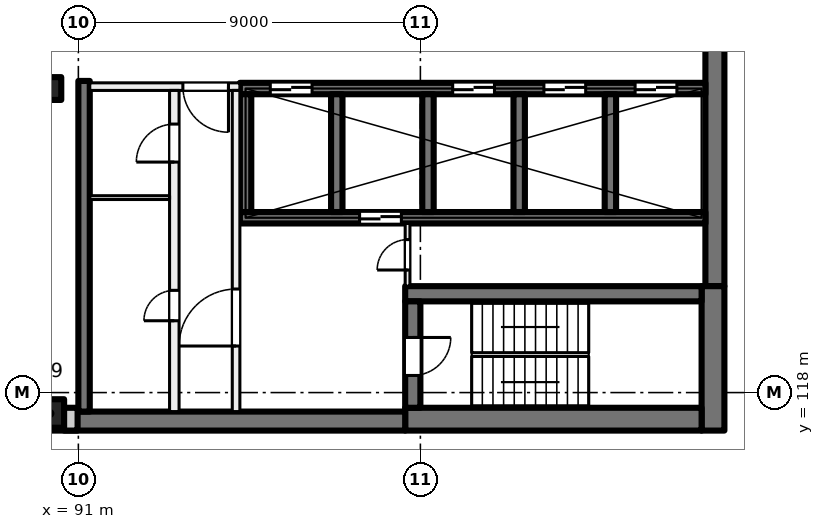
"""IFC4 building model, lengths in metres.
Left out: names, types, materials, properties, quantities, classifications, styles, units other than length and angle.
Written with IfcOpenShell. Run it as: python <this file> out.ifc"""

import sys

from ifc_helpers import new_model, si_unit, direction, frame, frame_2d, origin, origin_2d, place, context, subcontext, project, spatial, rectangle, extrude, element, fill, save


model = new_model("IFC4")
c1 = context("Model", 3, precision=1e-05, world=origin(), true_north=direction((0.0, 1.0)))
c2 = subcontext(c1, "Body", "Model", "MODEL_VIEW")
j1 = project(units=[si_unit("LENGTHUNIT", "METRE"), si_unit("PLANEANGLEUNIT", "RADIAN")], contexts=[c1])
p1 = place(None, origin())
s1 = spatial("IfcSite", under=j1, at=p1, CompositionType="ELEMENT")
p2 = place(p1, origin())
s2 = spatial("IfcBuilding", under=s1, at=p2, CompositionType="ELEMENT")
p3 = place(p2, frame((0.0, 0.0, 200.0)))
s3 = spatial("IfcBuildingStorey", under=s2, at=p3, CompositionType="ELEMENT", Elevation=200.0)
p4 = place(p3, frame((90.25, 126.0, 0.0), z_axis=(0.0, 0.0, 1.0), x_axis=(1.0, 0.0, 0.0)))
e1 = element("IfcColumn", 1, at=p4, inside=s3, PredefinedType="COLUMN", context=c2, shape_type="SweptSolid", body=[
    extrude(rectangle(XDim=0.6, YDim=0.6, at=origin_2d()), origin(), (0.0, 0.0, 1.0), 4.0),
])
p5 = place(p3, frame((90.25, 117.45, 0.0), z_axis=(0.0, 0.0, 1.0), x_axis=(1.0, 0.0, 0.0)))
e2 = element("IfcColumn", 2, at=p5, inside=s3, PredefinedType="COLUMN", context=c2, shape_type="SweptSolid", body=[
    extrude(rectangle(XDim=0.75, YDim=0.75, at=origin_2d()), origin(), (0.0, 0.0, 1.0), 4.0),
])
p6 = place(p3, frame((107.75, 135.2, 0.0), z_axis=(0.0, 0.0, 1.0), x_axis=(0.0, -1.0, 0.0)))
e3 = element("IfcWall", 3, at=p6, inside=s3, PredefinedType="SHEAR", context=c2, shape_type="SweptSolid", body=[
    extrude(rectangle(XDim=14.4, YDim=0.5, at=frame_2d((7.2, 0.0))), origin(), (0.0, 0.0, 1.0), 4.0),
])
p7 = place(p3, frame((107.7, 120.8, 0.0), z_axis=(0.0, 0.0, 1.0), x_axis=(0.0, -1.0, 0.0)))
e4 = element("IfcWall", 4, at=p7, inside=s3, PredefinedType="SHEAR", context=c2, shape_type="SweptSolid", body=[
    extrude(rectangle(XDim=3.8, YDim=0.6, at=frame_2d((1.9, 0.0))), origin(), (0.0, 0.0, 1.0), 4.0),
])
p8 = place(p3, frame((107.4, 117.3, 0.0), z_axis=(0.0, 0.0, 1.0), x_axis=(-1.0, 0.0, 0.0)))
e5 = element("IfcWall", 5, at=p8, inside=s3, PredefinedType="SHEAR", context=c2, shape_type="SweptSolid", body=[
    extrude(rectangle(XDim=7.8, YDim=0.6, at=frame_2d((3.9, 0.0))), origin(), (0.0, 0.0, 1.0), 4.0),
])
p9 = place(p3, frame((99.6, 117.25, 0.0), z_axis=(0.0, 0.0, 1.0), x_axis=(-1.0, 0.0, 0.0)))
e6 = element("IfcWall", 6, at=p9, inside=s3, PredefinedType="SHEAR", context=c2, shape_type="SweptSolid", body=[
    extrude(rectangle(XDim=8.975, YDim=0.5, at=frame_2d((4.488, 0.0))), origin(), (0.0, 0.0, 1.0), 4.0),
])
p10 = place(p3, frame((107.4, 120.6, 0.0), z_axis=(0.0, 0.0, 1.0), x_axis=(-1.0, 0.0, 0.0)))
e7 = element("IfcWall", 7, at=p10, inside=s3, PredefinedType="SHEAR", context=c2, shape_type="SweptSolid", body=[
    extrude(rectangle(XDim=7.8, YDim=0.4, at=frame_2d((3.9, 0.0))), origin(), (0.0, 0.0, 1.0), 4.0),
])
p11 = place(p3, frame((99.8, 120.4, 0.0), z_axis=(0.0, 0.0, 1.0), x_axis=(0.0, -1.0, 0.0)))
e8 = element("IfcWall", 8, at=p11, inside=s3, PredefinedType="SHEAR", context=c2, shape_type="SweptSolid", body=[
    extrude(rectangle(XDim=2.8, YDim=0.4, at=frame_2d((1.4, 0.0))), origin(), (0.0, 0.0, 1.0), 4.0),
])
p12 = place(p11, frame((0.95, 0.0, 0.0)))
e9 = element("IfcOpeningElement", 9, at=p12, cuts=e8, PredefinedType="OPENING", context=c2, shape_type="SweptSolid", body=[
    extrude(rectangle(XDim=1.0, YDim=2.1, at=frame_2d((0.5, 1.05))), frame((0.0, 0.21, 0.0), z_axis=(0.0, -1.0, 0.0), x_axis=(1.0, 0.0, 0.0)), (0.0, 0.0, 1.0), 0.42),
])
p13 = place(p3, frame((107.5, 126.0, 0.0), z_axis=(0.0, 0.0, 1.0), x_axis=(-1.0, 0.0, 0.0)))
e10 = element("IfcWall", 10, at=p13, inside=s3, PredefinedType="SHEAR", context=c2, shape_type="SweptSolid", body=[
    extrude(rectangle(XDim=12.25, YDim=0.3, at=frame_2d((6.125, 0.0))), origin(), (0.0, 0.0, 1.0), 4.0),
])
p14 = place(p13, frame((0.75, 0.0, 0.0)))
e11 = element("IfcOpeningElement", 11, at=p14, cuts=e10, PredefinedType="OPENING", context=c2, shape_type="SweptSolid", body=[
    extrude(rectangle(XDim=1.1, YDim=2.1, at=frame_2d((0.55, 1.05))), frame((0.0, 0.16, 0.0), z_axis=(0.0, -1.0, 0.0), x_axis=(1.0, 0.0, 0.0)), (0.0, 0.0, 1.0), 0.32),
])
p15 = place(p13, frame((3.15, 0.0, 0.0)))
e12 = element("IfcOpeningElement", 12, at=p15, cuts=e10, PredefinedType="OPENING", context=c2, shape_type="SweptSolid", body=[
    extrude(rectangle(XDim=1.1, YDim=2.1, at=frame_2d((0.55, 1.05))), frame((0.0, 0.16, 0.0), z_axis=(0.0, -1.0, 0.0), x_axis=(1.0, 0.0, 0.0)), (0.0, 0.0, 1.0), 0.32),
])
p16 = place(p13, frame((5.55, 0.0, 0.0)))
e13 = element("IfcOpeningElement", 13, at=p16, cuts=e10, PredefinedType="OPENING", context=c2, shape_type="SweptSolid", body=[
    extrude(rectangle(XDim=1.1, YDim=2.1, at=frame_2d((0.55, 1.05))), frame((0.0, 0.16, 0.0), z_axis=(0.0, -1.0, 0.0), x_axis=(1.0, 0.0, 0.0)), (0.0, 0.0, 1.0), 0.32),
])
p17 = place(p13, frame((10.35, 0.0, 0.0)))
e14 = element("IfcOpeningElement", 14, at=p17, cuts=e10, PredefinedType="OPENING", context=c2, shape_type="SweptSolid", body=[
    extrude(rectangle(XDim=1.1, YDim=2.1, at=frame_2d((0.55, 1.05))), frame((0.0, 0.16, 0.0), z_axis=(0.0, -1.0, 0.0), x_axis=(1.0, 0.0, 0.0)), (0.0, 0.0, 1.0), 0.32),
])
p18 = place(p3, frame((107.5, 122.6, 0.0), z_axis=(0.0, 0.0, 1.0), x_axis=(-1.0, 0.0, 0.0)))
e15 = element("IfcWall", 15, at=p18, inside=s3, PredefinedType="SHEAR", context=c2, shape_type="SweptSolid", body=[
    extrude(rectangle(XDim=12.25, YDim=0.3, at=frame_2d((6.125, 0.0))), origin(), (0.0, 0.0, 1.0), 4.0),
])
p19 = place(p18, frame((8.0, 0.0, 0.0)))
e16 = element("IfcOpeningElement", 16, at=p19, cuts=e15, PredefinedType="OPENING", context=c2, shape_type="SweptSolid", body=[
    extrude(rectangle(XDim=1.1, YDim=2.1, at=frame_2d((0.55, 1.05))), frame((0.0, 0.16, 0.0), z_axis=(0.0, -1.0, 0.0), x_axis=(1.0, 0.0, 0.0)), (0.0, 0.0, 1.0), 0.32),
])
for number, where, z_axis, x_axis in (
    (17, (105.0, 125.85, 0.0), (0.0, 0.0, 1.0), (0.0, -1.0, 0.0)),
    (18, (102.6, 125.85, 0.0), (0.0, 0.0, 1.0), (0.0, -1.0, 0.0)),
    (19, (100.2, 125.85, 0.0), (0.0, 0.0, 1.0), (0.0, -1.0, 0.0)),
    (20, (97.8, 125.85, 0.0), (0.0, 0.0, 1.0), (0.0, -1.0, 0.0)),
    (21, (95.4, 125.85, 0.0), (0.0, 0.0, 1.0), (0.0, -1.0, 0.0)),
):
    element("IfcWall", number, at=place(p3, frame(where, z_axis=z_axis, x_axis=x_axis)), inside=s3, PredefinedType="SHEAR", context=c2, shape_type="SweptSolid", body=[
        extrude(rectangle(XDim=3.1, YDim=0.3, at=frame_2d((1.55, 0.0))), origin(), (0.0, 0.0, 1.0), 4.0),
    ])
p20 = place(p3, frame((91.15, 126.2, 0.0), z_axis=(0.0, 0.0, 1.0), x_axis=(0.0, -1.0, 0.0)))
e22 = element("IfcWall", 22, at=p20, inside=s3, PredefinedType="SHEAR", context=c2, shape_type="SweptSolid", body=[
    extrude(rectangle(XDim=8.7, YDim=0.3, at=frame_2d((4.35, 0.0))), origin(), (0.0, 0.0, 1.0), 4.0),
])
p21 = place(p3, frame((90.98, 117.3, 0.0), z_axis=(0.0, 0.0, 1.0), x_axis=(-1.0, 0.0, 0.0)))
e23 = element("IfcWall", 23, at=p21, inside=s3, PredefinedType="SOLIDWALL", context=c2, shape_type="SweptSolid", body=[
    extrude(rectangle(XDim=33.745, YDim=0.6, at=frame_2d((16.873, 0.0))), origin(), (0.0, 0.0, 1.0), 3.625),
])
p22 = place(p21, frame((1.48, 0.0, 0.9)))
e24 = element("IfcOpeningElement", 24, at=p22, cuts=e23, PredefinedType="OPENING", context=c2, shape_type="SweptSolid", body=[
    extrude(rectangle(XDim=3.0, YDim=2.4, at=frame_2d((1.5, 1.2))), frame((0.0, 0.31, 0.0), z_axis=(0.0, -1.0, 0.0), x_axis=(1.0, 0.0, 0.0)), (0.0, 0.0, 1.0), 0.62),
])
p23 = place(p21, frame((5.98, 0.0, 0.9)))
e25 = element("IfcOpeningElement", 25, at=p23, cuts=e23, PredefinedType="OPENING", context=c2, shape_type="SweptSolid", body=[
    extrude(rectangle(XDim=3.0, YDim=2.4, at=frame_2d((1.5, 1.2))), frame((0.0, 0.31, 0.0), z_axis=(0.0, -1.0, 0.0), x_axis=(1.0, 0.0, 0.0)), (0.0, 0.0, 1.0), 0.62),
])
p24 = place(p21, frame((10.48, 0.0, 0.9)))
e26 = element("IfcOpeningElement", 26, at=p24, cuts=e23, PredefinedType="OPENING", context=c2, shape_type="SweptSolid", body=[
    extrude(rectangle(XDim=3.0, YDim=2.4, at=frame_2d((1.5, 1.2))), frame((0.0, 0.31, 0.0), z_axis=(0.0, -1.0, 0.0), x_axis=(1.0, 0.0, 0.0)), (0.0, 0.0, 1.0), 0.62),
])
p25 = place(p21, frame((14.98, 0.0, 0.9)))
e27 = element("IfcOpeningElement", 27, at=p25, cuts=e23, PredefinedType="OPENING", context=c2, shape_type="SweptSolid", body=[
    extrude(rectangle(XDim=3.0, YDim=2.4, at=frame_2d((1.5, 1.2))), frame((0.0, 0.31, 0.0), z_axis=(0.0, -1.0, 0.0), x_axis=(1.0, 0.0, 0.0)), (0.0, 0.0, 1.0), 0.62),
])
p26 = place(p21, frame((19.48, 0.0, 0.9)))
e28 = element("IfcOpeningElement", 28, at=p26, cuts=e23, PredefinedType="OPENING", context=c2, shape_type="SweptSolid", body=[
    extrude(rectangle(XDim=3.0, YDim=2.4, at=frame_2d((1.5, 1.2))), frame((0.0, 0.31, 0.0), z_axis=(0.0, -1.0, 0.0), x_axis=(1.0, 0.0, 0.0)), (0.0, 0.0, 1.0), 0.62),
])
p27 = place(p21, frame((23.98, 0.0, 0.9)))
e29 = element("IfcOpeningElement", 29, at=p27, cuts=e23, PredefinedType="OPENING", context=c2, shape_type="SweptSolid", body=[
    extrude(rectangle(XDim=3.0, YDim=2.4, at=frame_2d((1.5, 1.2))), frame((0.0, 0.31, 0.0), z_axis=(0.0, -1.0, 0.0), x_axis=(1.0, 0.0, 0.0)), (0.0, 0.0, 1.0), 0.62),
])
p28 = place(p21, frame((28.48, 0.0, 0.9)))
e30 = element("IfcOpeningElement", 30, at=p28, cuts=e23, PredefinedType="OPENING", context=c2, shape_type="SweptSolid", body=[
    extrude(rectangle(XDim=3.0, YDim=2.4, at=frame_2d((1.5, 1.2))), frame((0.0, 0.31, 0.0), z_axis=(0.0, -1.0, 0.0), x_axis=(1.0, 0.0, 0.0)), (0.0, 0.0, 1.0), 0.62),
])
p29 = place(p3, frame((95.25, 126.05, 0.0), z_axis=(0.0, 0.0, 1.0), x_axis=(-1.0, 0.0, 0.0)))
e31 = element("IfcWall", 31, at=p29, inside=s3, PredefinedType="PARTITIONING", context=c2, shape_type="SweptSolid", body=[
    extrude(rectangle(XDim=3.95, YDim=0.2, at=frame_2d((1.975, 0.0))), origin(), (0.0, 0.0, 1.0), 3.625),
])
p30 = place(p29, frame((0.3, 0.0, 0.0)))
e32 = element("IfcOpeningElement", 32, at=p30, cuts=e31, PredefinedType="OPENING", context=c2, shape_type="SweptSolid", body=[
    extrude(rectangle(XDim=1.2, YDim=2.1, at=frame_2d((0.6, 1.05))), frame((0.0, 0.11, 0.0), z_axis=(0.0, -1.0, 0.0), x_axis=(1.0, 0.0, 0.0)), (0.0, 0.0, 1.0), 0.22),
])
p31 = place(p3, frame((95.15, 117.5, 0.0), z_axis=(0.0, 0.0, 1.0), x_axis=(0.0, 1.0, 0.0)))
e33 = element("IfcWall", 33, at=p31, inside=s3, PredefinedType="PARTITIONING", context=c2, shape_type="SweptSolid", body=[
    extrude(rectangle(XDim=8.45, YDim=0.2, at=frame_2d((4.225, 0.0))), origin(), (0.0, 0.0, 1.0), 3.625),
])
p32 = place(p31, frame((1.725, 0.0, 0.0)))
e34 = element("IfcOpeningElement", 34, at=p32, cuts=e33, PredefinedType="OPENING", context=c2, shape_type="SweptSolid", body=[
    extrude(rectangle(XDim=1.5, YDim=2.1, at=frame_2d((0.75, 1.05))), frame((0.0, 0.11, 0.0), z_axis=(0.0, -1.0, 0.0), x_axis=(1.0, 0.0, 0.0)), (0.0, 0.0, 1.0), 0.22),
])
p33 = place(p3, frame((93.525, 117.5, 0.0), z_axis=(0.0, 0.0, 1.0), x_axis=(0.0, 1.0, 0.0)))
e35 = element("IfcWall", 35, at=p33, inside=s3, PredefinedType="PARTITIONING", context=c2, shape_type="SweptSolid", body=[
    extrude(rectangle(XDim=8.45, YDim=0.25, at=frame_2d((4.225, 0.0))), origin(), (0.0, 0.0, 1.0), 3.625),
])
p34 = place(p33, frame((6.565, 0.0, 0.0)))
e36 = element("IfcOpeningElement", 36, at=p34, cuts=e35, PredefinedType="OPENING", context=c2, shape_type="SweptSolid", body=[
    extrude(rectangle(XDim=1.0, YDim=2.1, at=frame_2d((0.5, 1.05))), frame((0.0, 0.135, 0.0), z_axis=(0.0, -1.0, 0.0), x_axis=(1.0, 0.0, 0.0)), (0.0, 0.0, 1.0), 0.27),
])
p35 = place(p33, frame((2.39, 0.0, 0.0)))
e37 = element("IfcOpeningElement", 37, at=p35, cuts=e35, PredefinedType="OPENING", context=c2, shape_type="SweptSolid", body=[
    extrude(rectangle(XDim=0.8, YDim=2.1, at=frame_2d((0.4, 1.05))), frame((0.0, 0.135, 0.0), z_axis=(0.0, -1.0, 0.0), x_axis=(1.0, 0.0, 0.0)), (0.0, 0.0, 1.0), 0.27),
])
p36 = place(p3, frame((99.663, 120.8, 0.0), z_axis=(0.0, 0.0, 1.0), x_axis=(0.0, 1.0, 0.0)))
e38 = element("IfcWall", 38, at=p36, inside=s3, PredefinedType="PARTITIONING", context=c2, shape_type="SweptSolid", body=[
    extrude(rectangle(XDim=1.65, YDim=0.125, at=frame_2d((0.825, 0.0))), origin(), (0.0, 0.0, 1.0), 3.625),
])
p37 = place(p36, frame((0.425, 0.0, 0.0)))
e39 = element("IfcOpeningElement", 39, at=p37, cuts=e38, PredefinedType="OPENING", context=c2, shape_type="SweptSolid", body=[
    extrude(rectangle(XDim=0.8, YDim=2.1, at=frame_2d((0.4, 1.05))), frame((0.0, 0.073, 0.0), z_axis=(0.0, -1.0, 0.0), x_axis=(1.0, 0.0, 0.0)), (0.0, 0.0, 1.0), 0.145),
])
p38 = place(p3, frame((93.4, 123.13, 0.0), z_axis=(0.0, 0.0, 1.0), x_axis=(-1.0, 0.0, 0.0)))
e40 = element("IfcWall", 40, at=p38, inside=s3, PredefinedType="PARTITIONING", context=c2, shape_type="SweptSolid", body=[
    extrude(rectangle(XDim=2.1, YDim=0.1, at=frame_2d((1.05, 0.0))), origin(), (0.0, 0.0, 1.0), 3.625),
])
p39 = place(p14, origin())
e41 = element("IfcDoor", 41, at=p39, inside=s3, OperationType="DOUBLE_DOOR_SLIDING", PredefinedType="DOOR", context=c2, shape_type="SweptSolid", body=[
    extrude(rectangle(XDim=1.1, YDim=2.1, at=frame_2d((0.55, 1.05))), frame((0.0, 0.025, 0.0), z_axis=(0.0, -1.0, 0.0), x_axis=(1.0, 0.0, 0.0)), (0.0, 0.0, 1.0), 0.05),
])
fill(e11, e41)
p40 = place(p15, origin())
e42 = element("IfcDoor", 42, at=p40, inside=s3, OperationType="DOUBLE_DOOR_SLIDING", PredefinedType="DOOR", context=c2, shape_type="SweptSolid", body=[
    extrude(rectangle(XDim=1.1, YDim=2.1, at=frame_2d((0.55, 1.05))), frame((0.0, 0.025, 0.0), z_axis=(0.0, -1.0, 0.0), x_axis=(1.0, 0.0, 0.0)), (0.0, 0.0, 1.0), 0.05),
])
fill(e12, e42)
p41 = place(p16, origin())
e43 = element("IfcDoor", 43, at=p41, inside=s3, OperationType="DOUBLE_DOOR_SLIDING", PredefinedType="DOOR", context=c2, shape_type="SweptSolid", body=[
    extrude(rectangle(XDim=1.1, YDim=2.1, at=frame_2d((0.55, 1.05))), frame((0.0, 0.025, 0.0), z_axis=(0.0, -1.0, 0.0), x_axis=(1.0, 0.0, 0.0)), (0.0, 0.0, 1.0), 0.05),
])
fill(e13, e43)
p42 = place(p17, origin())
e44 = element("IfcDoor", 44, at=p42, inside=s3, OperationType="DOUBLE_DOOR_SLIDING", PredefinedType="DOOR", context=c2, shape_type="SweptSolid", body=[
    extrude(rectangle(XDim=1.1, YDim=2.1, at=frame_2d((0.55, 1.05))), frame((0.0, 0.025, 0.0), z_axis=(0.0, -1.0, 0.0), x_axis=(1.0, 0.0, 0.0)), (0.0, 0.0, 1.0), 0.05),
])
fill(e14, e44)
p43 = place(p30, origin())
e45 = element("IfcDoor", 45, at=p43, inside=s3, OperationType="DOUBLE_DOOR_SINGLE_SWING", PredefinedType="DOOR", context=c2, shape_type="SweptSolid", body=[
    extrude(rectangle(XDim=1.2, YDim=2.1, at=frame_2d((0.6, 1.05))), frame((0.0, 0.025, 0.0), z_axis=(0.0, -1.0, 0.0), x_axis=(1.0, 0.0, 0.0)), (0.0, 0.0, 1.0), 0.05),
])
fill(e32, e45)
p44 = place(p32, origin())
e46 = element("IfcDoor", 46, at=p44, inside=s3, OperationType="DOUBLE_DOOR_SINGLE_SWING", PredefinedType="DOOR", context=c2, shape_type="SweptSolid", body=[
    extrude(rectangle(XDim=1.5, YDim=2.1, at=frame_2d((0.75, 1.05))), frame((0.0, 0.025, 0.0), z_axis=(0.0, -1.0, 0.0), x_axis=(1.0, 0.0, 0.0)), (0.0, 0.0, 1.0), 0.05),
])
fill(e34, e46)
p45 = place(p12, origin())
e47 = element("IfcDoor", 47, at=p45, inside=s3, OperationType="SINGLE_SWING_LEFT", PredefinedType="DOOR", context=c2, shape_type="SweptSolid", body=[
    extrude(rectangle(XDim=1.0, YDim=2.1, at=frame_2d((0.5, 1.05))), frame((0.0, 0.025, 0.0), z_axis=(0.0, -1.0, 0.0), x_axis=(1.0, 0.0, 0.0)), (0.0, 0.0, 1.0), 0.05),
])
fill(e9, e47)
p46 = place(p37, origin())
e48 = element("IfcDoor", 48, at=p46, inside=s3, OperationType="SINGLE_SWING_RIGHT", PredefinedType="DOOR", context=c2, shape_type="SweptSolid", body=[
    extrude(rectangle(XDim=0.8, YDim=2.1, at=frame_2d((0.4, 1.05))), frame((0.0, 0.025, 0.0), z_axis=(0.0, -1.0, 0.0), x_axis=(1.0, 0.0, 0.0)), (0.0, 0.0, 1.0), 0.05),
])
fill(e39, e48)
p47 = place(p34, origin())
e49 = element("IfcDoor", 49, at=p47, inside=s3, OperationType="SINGLE_SWING_LEFT", PredefinedType="DOOR", context=c2, shape_type="SweptSolid", body=[
    extrude(rectangle(XDim=1.0, YDim=2.1, at=frame_2d((0.5, 1.05))), frame((0.0, 0.025, 0.0), z_axis=(0.0, -1.0, 0.0), x_axis=(1.0, 0.0, 0.0)), (0.0, 0.0, 1.0), 0.05),
])
fill(e36, e49)
p48 = place(p35, origin())
e50 = element("IfcDoor", 50, at=p48, inside=s3, OperationType="SINGLE_SWING_RIGHT", PredefinedType="DOOR", context=c2, shape_type="SweptSolid", body=[
    extrude(rectangle(XDim=0.8, YDim=2.1, at=frame_2d((0.4, 1.05))), frame((0.0, 0.025, 0.0), z_axis=(0.0, -1.0, 0.0), x_axis=(1.0, 0.0, 0.0)), (0.0, 0.0, 1.0), 0.05),
])
fill(e37, e50)
p49 = place(p19, origin())
e51 = element("IfcDoor", 51, at=p49, inside=s3, OperationType="DOUBLE_DOOR_SLIDING", PredefinedType="DOOR", context=c2, shape_type="SweptSolid", body=[
    extrude(rectangle(XDim=1.1, YDim=2.1, at=frame_2d((0.55, 1.05))), frame((0.0, 0.025, 0.0), z_axis=(0.0, -1.0, 0.0), x_axis=(1.0, 0.0, 0.0)), (0.0, 0.0, 1.0), 0.05),
])
fill(e16, e51)
save(model, sys.argv[1])
